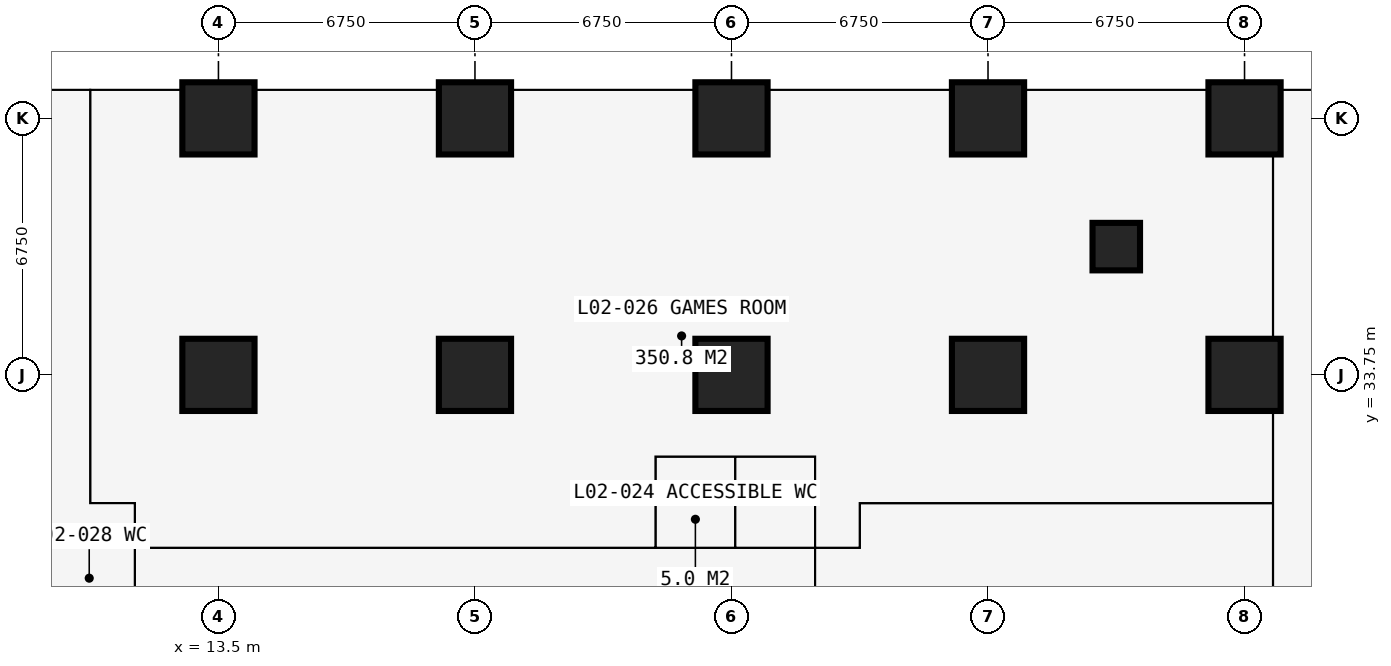
"""IFC4 building model, lengths in metres.
Left out: names, types, materials, properties, quantities, classifications, styles, units other than length and angle.
Written with IfcOpenShell. Run it as: python <this file> out.ifc"""

import sys

from ifc_helpers import new_model, si_unit, direction, frame, frame_2d, origin, origin_2d, place, context, subcontext, project, spatial, rectangle, extrude, element, fill, save


model = new_model("IFC4")
c1 = context("Model", 3, precision=1e-05, world=origin(), true_north=direction((0.0, 1.0)))
c2 = subcontext(c1, "Body", "Model", "MODEL_VIEW")
j1 = project(units=[si_unit("LENGTHUNIT", "METRE"), si_unit("PLANEANGLEUNIT", "RADIAN")], contexts=[c1])
p1 = place(None, origin())
s1 = spatial("IfcSite", under=j1, at=p1, CompositionType="ELEMENT")
p2 = place(p1, origin())
s2 = spatial("IfcBuilding", under=s1, at=p2, CompositionType="ELEMENT")
p3 = place(p2, frame((0.0, 0.0, 9.0)))
s3 = spatial("IfcBuildingStorey", under=s2, at=p3, CompositionType="ELEMENT", Elevation=9.0)
for number, where, z_axis, x_axis in (
    (1, (13.5, 33.75, 0.0), (0.0, 0.0, 1.0), (1.0, 0.0, 0.0)),
    (2, (13.5, 40.5, 0.0), (0.0, 0.0, 1.0), (1.0, 0.0, 0.0)),
    (3, (20.25, 33.75, 0.0), (0.0, 0.0, 1.0), (1.0, 0.0, 0.0)),
    (4, (20.25, 40.5, 0.0), (0.0, 0.0, 1.0), (1.0, 0.0, 0.0)),
    (5, (27.0, 33.75, 0.0), (0.0, 0.0, 1.0), (1.0, 0.0, 0.0)),
    (6, (27.0, 40.5, 0.0), (0.0, 0.0, 1.0), (1.0, 0.0, 0.0)),
    (7, (33.75, 33.75, 0.0), (0.0, 0.0, 1.0), (1.0, 0.0, 0.0)),
    (8, (33.75, 40.5, 0.0), (0.0, 0.0, 1.0), (1.0, 0.0, 0.0)),
):
    element("IfcColumn", number, at=place(p3, frame(where, z_axis=z_axis, x_axis=x_axis)), inside=s3, PredefinedType="COLUMN", context=c2, shape_type="SweptSolid", body=[
        extrude(rectangle(XDim=1.9, YDim=1.9, at=origin_2d()), origin(), (0.0, 0.0, 1.0), 4.5),
    ])
p4 = place(p3, frame((37.125, 37.125, 0.0), z_axis=(0.0, 0.0, 1.0), x_axis=(1.0, 0.0, 0.0)))
e9 = element("IfcColumn", 9, at=p4, inside=s3, PredefinedType="COLUMN", context=c2, shape_type="SweptSolid", body=[
    extrude(rectangle(XDim=1.25, YDim=1.25, at=origin_2d()), origin(), (0.0, 0.0, 1.0), 4.5),
])
for number, where, z_axis, x_axis in (
    (10, (40.5, 33.75, 0.0), (0.0, 0.0, 1.0), (1.0, 0.0, 0.0)),
    (11, (40.5, 40.5, 0.0), (0.0, 0.0, 1.0), (1.0, 0.0, 0.0)),
):
    element("IfcColumn", number, at=place(p3, frame(where, z_axis=z_axis, x_axis=x_axis)), inside=s3, PredefinedType="COLUMN", context=c2, shape_type="SweptSolid", body=[
        extrude(rectangle(XDim=1.9, YDim=1.9, at=origin_2d()), origin(), (0.0, 0.0, 1.0), 4.5),
    ])
p5 = place(p3, frame((8.9, 29.2, 0.0), z_axis=(0.0, 0.0, 1.0), x_axis=(1.0, 0.0, 0.0)))
e12 = element("IfcWall", 12, at=p5, inside=s3, PredefinedType="PARTITIONING", context=c2, shape_type="SweptSolid", body=[
    extrude(rectangle(XDim=21.475, YDim=0.15, at=frame_2d((10.738, 0.0))), origin(), (0.0, 0.0, 1.0), 4.25),
])
p6 = place(p5, frame((16.65, 0.0, 0.0)))
e13 = element("IfcOpeningElement", 13, at=p6, cuts=e12, PredefinedType="OPENING", context=c2, shape_type="SweptSolid", body=[
    extrude(rectangle(XDim=1.0, YDim=2.2, at=frame_2d((0.5, 1.1))), frame((0.0, 0.085, 0.0), z_axis=(0.0, -1.0, 0.0), x_axis=(1.0, 0.0, 0.0)), (0.0, 0.0, 1.0), 0.17),
])
p7 = place(p5, frame((18.75, 0.0, 0.0)))
e14 = element("IfcOpeningElement", 14, at=p7, cuts=e12, PredefinedType="OPENING", context=c2, shape_type="SweptSolid", body=[
    extrude(rectangle(XDim=1.0, YDim=2.2, at=frame_2d((0.5, 1.1))), frame((0.0, 0.085, 0.0), z_axis=(0.0, -1.0, 0.0), x_axis=(1.0, 0.0, 0.0)), (0.0, 0.0, 1.0), 0.17),
])
p8 = place(p5, frame((8.45, 0.0, 0.0)))
e15 = element("IfcOpeningElement", 15, at=p8, cuts=e12, PredefinedType="OPENING", context=c2, shape_type="SweptSolid", body=[
    extrude(rectangle(XDim=1.6, YDim=2.4, at=frame_2d((0.8, 1.2))), frame((0.0, 0.085, 0.0), z_axis=(0.0, -1.0, 0.0), x_axis=(1.0, 0.0, 0.0)), (0.0, 0.0, 1.0), 0.17),
])
p9 = place(p3, frame((10.125, 30.375, 0.0), z_axis=(0.0, 0.0, 1.0), x_axis=(0.0, 1.0, 0.0)))
e16 = element("IfcWall", 16, at=p9, inside=s3, PredefinedType="PARTITIONING", context=c2, shape_type="SweptSolid", body=[
    extrude(rectangle(XDim=10.859, YDim=0.15, at=frame_2d((5.429, 0.0))), origin(), (0.0, 0.0, 1.0), 4.25),
])
p10 = place(p3, frame((10.125, 30.375, 0.0), z_axis=(0.0, 0.0, 1.0), x_axis=(1.0, 0.0, 0.0)))
e17 = element("IfcWall", 17, at=p10, inside=s3, PredefinedType="PARTITIONING", context=c2, shape_type="SweptSolid", body=[
    extrude(rectangle(XDim=1.175, YDim=0.15, at=frame_2d((0.587, 0.0))), origin(), (0.0, 0.0, 1.0), 4.25),
])
p11 = place(p3, frame((11.3, 8.9, 0.0), z_axis=(0.0, 0.0, 1.0), x_axis=(0.0, 1.0, 0.0)))
e18 = element("IfcWall", 18, at=p11, inside=s3, PredefinedType="PARTITIONING", context=c2, shape_type="SweptSolid", body=[
    extrude(rectangle(XDim=21.475, YDim=0.15, at=frame_2d((10.738, 0.0))), origin(), (0.0, 0.0, 1.0), 4.25),
])
p12 = place(p11, frame((16.65, 0.0, 0.0)))
e19 = element("IfcOpeningElement", 19, at=p12, cuts=e18, PredefinedType="OPENING", context=c2, shape_type="SweptSolid", body=[
    extrude(rectangle(XDim=1.0, YDim=2.2, at=frame_2d((0.5, 1.1))), frame((0.0, 0.085, 0.0), z_axis=(0.0, -1.0, 0.0), x_axis=(1.0, 0.0, 0.0)), (0.0, 0.0, 1.0), 0.17),
])
p13 = place(p11, frame((18.75, 0.0, 0.0)))
e20 = element("IfcOpeningElement", 20, at=p13, cuts=e18, PredefinedType="OPENING", context=c2, shape_type="SweptSolid", body=[
    extrude(rectangle(XDim=1.0, YDim=2.2, at=frame_2d((0.5, 1.1))), frame((0.0, 0.085, 0.0), z_axis=(0.0, -1.0, 0.0), x_axis=(1.0, 0.0, 0.0)), (0.0, 0.0, 1.0), 0.17),
])
p14 = place(p11, frame((8.45, 0.0, 0.0)))
e21 = element("IfcOpeningElement", 21, at=p14, cuts=e18, PredefinedType="OPENING", context=c2, shape_type="SweptSolid", body=[
    extrude(rectangle(XDim=1.6, YDim=2.4, at=frame_2d((0.8, 1.2))), frame((0.0, 0.085, 0.0), z_axis=(0.0, -1.0, 0.0), x_axis=(1.0, 0.0, 0.0)), (0.0, 0.0, 1.0), 0.17),
])
p15 = place(p3, frame((25.0, 29.2, 0.0), z_axis=(0.0, 0.0, 1.0), x_axis=(0.0, 1.0, 0.0)))
e22 = element("IfcWall", 22, at=p15, inside=s3, PredefinedType="PARTITIONING", context=c2, shape_type="SweptSolid", body=[
    extrude(rectangle(XDim=2.4, YDim=0.1, at=frame_2d((1.2, 0.0))), origin(), (0.0, 0.0, 1.0), 4.25),
])
p16 = place(p3, frame((25.0, 31.6, 0.0), z_axis=(0.0, 0.0, 1.0), x_axis=(1.0, 0.0, 0.0)))
e23 = element("IfcWall", 23, at=p16, inside=s3, PredefinedType="PARTITIONING", context=c2, shape_type="SweptSolid", body=[
    extrude(rectangle(XDim=4.2, YDim=0.15, at=frame_2d((2.1, 0.0))), origin(), (0.0, 0.0, 1.0), 4.25),
])
p17 = place(p3, frame((27.1, 29.2, 0.0), z_axis=(0.0, 0.0, 1.0), x_axis=(0.0, 1.0, 0.0)))
e24 = element("IfcWall", 24, at=p17, inside=s3, PredefinedType="PARTITIONING", context=c2, shape_type="SweptSolid", body=[
    extrude(rectangle(XDim=2.4, YDim=0.1, at=frame_2d((1.2, 0.0))), origin(), (0.0, 0.0, 1.0), 3.752),
])
p18 = place(p3, frame((29.2, 11.3, 0.0), z_axis=(0.0, 0.0, 1.0), x_axis=(0.0, 1.0, 0.0)))
e25 = element("IfcWall", 25, at=p18, inside=s3, PredefinedType="PARTITIONING", context=c2, shape_type="SweptSolid", body=[
    extrude(rectangle(XDim=20.3, YDim=0.15, at=frame_2d((10.15, 0.0))), origin(), (0.0, 0.0, 1.0), 4.25),
])
p19 = place(p18, frame((15.35, 0.0, 0.0)))
e26 = element("IfcOpeningElement", 26, at=p19, cuts=e25, PredefinedType="OPENING", context=c2, shape_type="SweptSolid", body=[
    extrude(rectangle(XDim=1.6, YDim=2.4, at=frame_2d((0.8, 1.2))), frame((0.0, 0.085, 0.0), z_axis=(0.0, -1.0, 0.0), x_axis=(1.0, 0.0, 0.0)), (0.0, 0.0, 1.0), 0.17),
])
p20 = place(p18, frame((8.35, 0.0, 0.0)))
e27 = element("IfcOpeningElement", 27, at=p20, cuts=e25, PredefinedType="OPENING", context=c2, shape_type="SweptSolid", body=[
    extrude(rectangle(XDim=1.2, YDim=2.2, at=frame_2d((0.6, 1.1))), frame((0.0, 0.085, 0.0), z_axis=(0.0, -1.0, 0.0), x_axis=(1.0, 0.0, 0.0)), (0.0, 0.0, 1.0), 0.17),
])
p21 = place(p3, frame((30.375, 29.2, 0.0), z_axis=(0.0, 0.0, 1.0), x_axis=(0.0, 1.0, 0.0)))
e28 = element("IfcWall", 28, at=p21, inside=s3, PredefinedType="PARTITIONING", context=c2, shape_type="SweptSolid", body=[
    extrude(rectangle(XDim=1.175, YDim=0.15, at=frame_2d((0.587, 0.0))), origin(), (0.0, 0.0, 1.0), 4.25),
])
p22 = place(p3, frame((30.375, 30.375, 0.0), z_axis=(0.0, 0.0, 1.0), x_axis=(1.0, 0.0, 0.0)))
e29 = element("IfcWall", 29, at=p22, inside=s3, PredefinedType="PARTITIONING", context=c2, shape_type="SweptSolid", body=[
    extrude(rectangle(XDim=10.875, YDim=0.15, at=frame_2d((5.438, 0.0))), origin(), (0.0, 0.0, 1.0), 4.25),
])
p23 = place(p3, frame((41.25, -0.75, 0.0), z_axis=(0.0, 0.0, 1.0), x_axis=(0.0, 1.0, 0.0)))
e30 = element("IfcWall", 30, at=p23, inside=s3, PredefinedType="PARTITIONING", context=c2, shape_type="SweptSolid", body=[
    extrude(rectangle(XDim=41.984, YDim=0.15, at=frame_2d((20.992, 0.0))), origin(), (0.0, 0.0, 1.0), 4.25),
])
p24 = place(p23, frame((15.2, 0.0, 0.0)))
e31 = element("IfcOpeningElement", 31, at=p24, cuts=e30, PredefinedType="OPENING", context=c2, shape_type="SweptSolid", body=[
    extrude(rectangle(XDim=1.6, YDim=2.4, at=frame_2d((0.8, 1.2))), frame((0.0, 0.085, 0.0), z_axis=(0.0, -1.0, 0.0), x_axis=(1.0, 0.0, 0.0)), (0.0, 0.0, 1.0), 0.17),
])
p25 = place(p19, origin())
e32 = element("IfcDoor", 32, at=p25, inside=s3, OperationType="DOUBLE_DOOR_SINGLE_SWING", PredefinedType="DOOR", context=c2, shape_type="SweptSolid", body=[
    extrude(rectangle(XDim=1.6, YDim=2.4, at=frame_2d((0.8, 1.2))), frame((0.0, 0.025, 0.0), z_axis=(0.0, -1.0, 0.0), x_axis=(1.0, 0.0, 0.0)), (0.0, 0.0, 1.0), 0.05),
])
fill(e26, e32)
p26 = place(p6, origin())
e33 = element("IfcDoor", 33, at=p26, inside=s3, OperationType="SINGLE_SWING_LEFT", PredefinedType="DOOR", context=c2, shape_type="SweptSolid", body=[
    extrude(rectangle(XDim=1.0, YDim=2.2, at=frame_2d((0.5, 1.1))), frame((0.0, 0.025, 0.0), z_axis=(0.0, -1.0, 0.0), x_axis=(1.0, 0.0, 0.0)), (0.0, 0.0, 1.0), 0.05),
])
fill(e13, e33)
p27 = place(p7, origin())
e34 = element("IfcDoor", 34, at=p27, inside=s3, OperationType="SINGLE_SWING_LEFT", PredefinedType="DOOR", context=c2, shape_type="SweptSolid", body=[
    extrude(rectangle(XDim=1.0, YDim=2.2, at=frame_2d((0.5, 1.1))), frame((0.0, 0.025, 0.0), z_axis=(0.0, -1.0, 0.0), x_axis=(1.0, 0.0, 0.0)), (0.0, 0.0, 1.0), 0.05),
])
fill(e14, e34)
p28 = place(p8, origin())
e35 = element("IfcDoor", 35, at=p28, inside=s3, OperationType="DOUBLE_DOOR_SINGLE_SWING", PredefinedType="DOOR", context=c2, shape_type="SweptSolid", body=[
    extrude(rectangle(XDim=1.6, YDim=2.4, at=frame_2d((0.8, 1.2))), frame((0.0, 0.025, 0.0), z_axis=(0.0, -1.0, 0.0), x_axis=(1.0, 0.0, 0.0)), (0.0, 0.0, 1.0), 0.05),
])
fill(e15, e35)
p29 = place(p13, origin())
e36 = element("IfcDoor", 36, at=p29, inside=s3, OperationType="SINGLE_SWING_LEFT", PredefinedType="DOOR", context=c2, shape_type="SweptSolid", body=[
    extrude(rectangle(XDim=1.0, YDim=2.2, at=frame_2d((0.5, 1.1))), frame((0.0, 0.025, 0.0), z_axis=(0.0, -1.0, 0.0), x_axis=(1.0, 0.0, 0.0)), (0.0, 0.0, 1.0), 0.05),
])
fill(e20, e36)
save(model, sys.argv[1])
